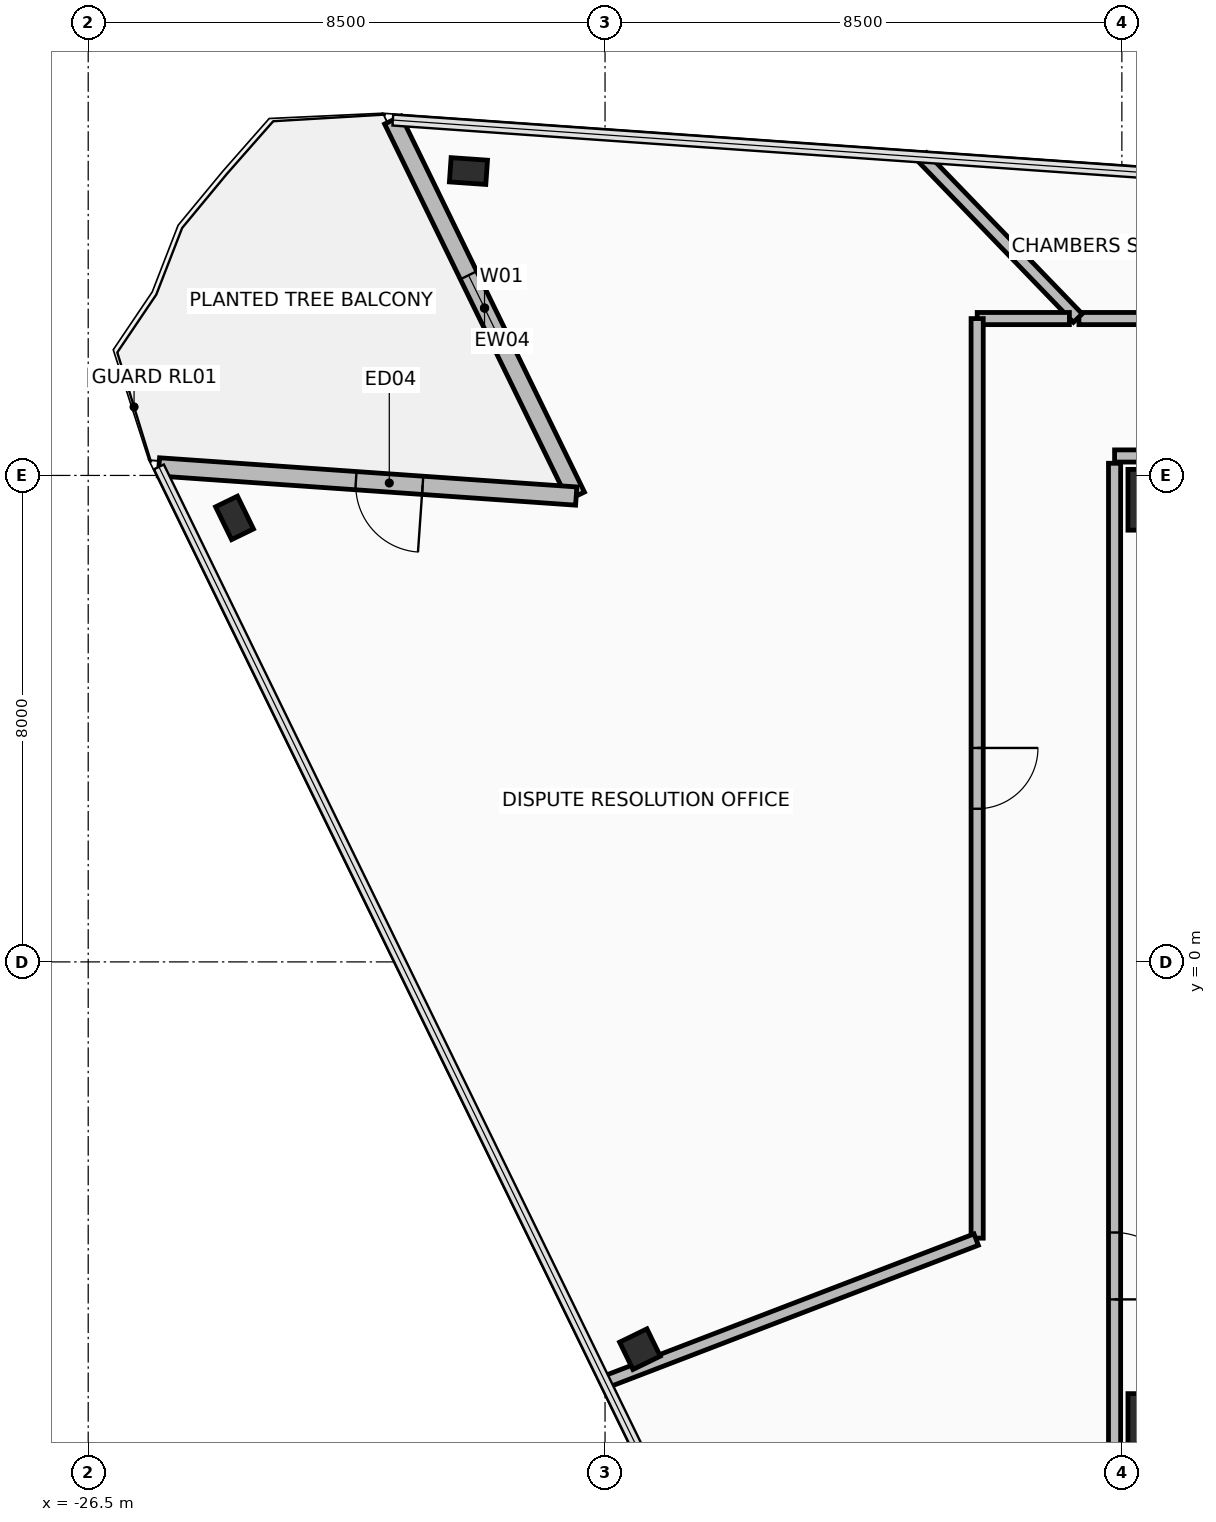
"""IFC4 building model, lengths in metres.
Left out: names, types, materials, properties, quantities, classifications, styles, units other than length and angle.
Written with IfcOpenShell. Run it as: python <this file> out.ifc"""

import sys

from ifc_helpers import new_model, si_unit, direction, frame, frame_2d, origin, origin_2d, place, context, subcontext, project, spatial, rectangle, hollow_rectangle, extrude, element, fill, save


model = new_model("IFC4")
c1 = context("Model", 3, precision=1e-05, world=origin(), true_north=direction((0.0, 1.0)))
c2 = subcontext(c1, "Body", "Model", "MODEL_VIEW")
j1 = project(units=[si_unit("LENGTHUNIT", "METRE"), si_unit("PLANEANGLEUNIT", "RADIAN")], contexts=[c1])
p1 = place(None, origin())
s1 = spatial("IfcSite", under=j1, at=p1, CompositionType="ELEMENT")
p2 = place(p1, origin())
s2 = spatial("IfcBuilding", under=s1, at=p2, CompositionType="ELEMENT")
p3 = place(p2, frame((0.0, 0.0, 241.45)))
s3 = spatial("IfcBuildingStorey", under=s2, at=p3, CompositionType="ELEMENT", Elevation=241.45)
for number, where, z_axis, x_axis in (
    (1, (-8.9, -7.6, 0.0), (0.0, 0.0, 1.0), (1.0, 0.0, 0.0)),
    (2, (-8.9, 7.6, 0.0), (0.0, 0.0, 1.0), (1.0, 0.0, 0.0)),
):
    element("IfcColumn", number, at=place(p3, frame(where, z_axis=z_axis, x_axis=x_axis)), inside=s3, PredefinedType="COLUMN", context=c2, shape_type="SweptSolid", body=[
        extrude(rectangle(XDim=1.0, YDim=1.0, at=origin_2d()), origin(), (0.0, 0.0, 1.0), 3.6),
    ])
p4 = place(p3, frame((-24.094, 7.302, 0.0), z_axis=(0.0, 0.0, 1.0), x_axis=(-0.438371146789, 0.898794046299, 0.0)))
e3 = element("IfcColumn", 3, at=p4, inside=s3, PredefinedType="COLUMN", context=c2, shape_type="SweptSolid", body=[
    extrude(hollow_rectangle(XDim=0.4, YDim=0.6, WallThickness=0.03, at=origin_2d()), origin(), (0.0, 0.0, 1.0), 3.6),
])
p5 = place(p3, frame((-17.426, -6.369, 0.0), z_axis=(0.0, 0.0, 1.0), x_axis=(-0.438371146789, 0.898794046299, 0.0)))
e4 = element("IfcColumn", 4, at=p5, inside=s3, PredefinedType="COLUMN", context=c2, shape_type="SweptSolid", body=[
    extrude(hollow_rectangle(XDim=0.5, YDim=0.5, WallThickness=0.032, at=origin_2d()), origin(), (0.0, 0.0, 1.0), 3.6),
])
p6 = place(p3, frame((-20.246, 13.006, 0.0), z_axis=(0.0, 0.0, 1.0), x_axis=(-0.99756405026, 0.069756473744, 0.0)))
e5 = element("IfcColumn", 5, at=p6, inside=s3, PredefinedType="COLUMN", context=c2, shape_type="SweptSolid", body=[
    extrude(hollow_rectangle(XDim=0.4, YDim=0.6, WallThickness=0.03, at=origin_2d()), origin(), (0.0, 0.0, 1.0), 3.6),
])
p7 = place(p3, frame((-21.49, 13.844, 0.0), z_axis=(0.0, 0.0, 1.0), x_axis=(0.438391471143, -0.898784133165, 0.0)))
e6 = element("IfcWall", 6, at=p7, inside=s3, PredefinedType="STANDARD", context=c2, shape_type="SweptSolid", body=[
    extrude(rectangle(XDim=6.88, YDim=0.3, at=frame_2d((3.44, 0.0))), origin(), (0.0, 0.0, 1.0), 2.765),
])
p8 = place(p7, frame((2.84, 0.0, 0.485)))
e7 = element("IfcOpeningElement", 7, at=p8, cuts=e6, PredefinedType="OPENING", context=c2, shape_type="SweptSolid", body=[
    extrude(rectangle(XDim=1.2, YDim=2.1, at=frame_2d((0.6, 1.05))), frame((0.0, 0.16, 0.0), z_axis=(0.0, -1.0, 0.0), x_axis=(1.0, 0.0, 0.0)), (0.0, 0.0, 1.0), 0.32),
])
p9 = place(p3, frame((-18.474, 7.661, 0.0), z_axis=(0.0, 0.0, 1.0), x_axis=(-0.997565982203, 0.069728840176, 0.0)))
e8 = element("IfcWall", 8, at=p9, inside=s3, PredefinedType="STANDARD", context=c2, shape_type="SweptSolid", body=[
    extrude(rectangle(XDim=6.88, YDim=0.3, at=frame_2d((3.44, 0.0))), origin(), (0.0, 0.0, 1.0), 2.765),
])
p10 = place(p9, frame((2.532, 0.0, 0.0)))
e9 = element("IfcOpeningElement", 9, at=p10, cuts=e8, PredefinedType="OPENING", context=c2, shape_type="SweptSolid", body=[
    extrude(rectangle(XDim=1.1, YDim=2.2, at=frame_2d((0.55, 1.1))), frame((0.0, 0.16, 0.0), z_axis=(0.0, -1.0, 0.0), x_axis=(1.0, 0.0, 0.0)), (0.0, 0.0, 1.0), 0.32),
])
p11 = place(p3, frame((9.62, 8.32, 0.0), z_axis=(0.0, 0.0, 1.0), x_axis=(-1.0, 0.0, 0.0)))
e10 = element("IfcWall", 10, at=p11, inside=s3, PredefinedType="PARTITIONING", context=c2, shape_type="SweptSolid", body=[
    extrude(rectangle(XDim=19.24, YDim=0.2, at=frame_2d((9.62, 0.0))), origin(), (0.0, 0.0, 1.0), 2.915),
])
p12 = place(p11, frame((10.97, 0.0, 0.0)))
e11 = element("IfcOpeningElement", 11, at=p12, cuts=e10, PredefinedType="OPENING", context=c2, shape_type="SweptSolid", body=[
    extrude(rectangle(XDim=0.9, YDim=2.1, at=frame_2d((0.45, 1.05))), frame((0.0, 0.11, 0.0), z_axis=(0.0, -1.0, 0.0), x_axis=(1.0, 0.0, 0.0)), (0.0, 0.0, 1.0), 0.22),
])
p13 = place(p11, frame((7.57, 0.0, 0.0)))
e12 = element("IfcOpeningElement", 12, at=p13, cuts=e10, PredefinedType="OPENING", context=c2, shape_type="SweptSolid", body=[
    extrude(rectangle(XDim=0.9, YDim=2.1, at=frame_2d((0.45, 1.05))), frame((0.0, 0.11, 0.0), z_axis=(0.0, -1.0, 0.0), x_axis=(1.0, 0.0, 0.0)), (0.0, 0.0, 1.0), 0.22),
])
p14 = place(p11, frame((15.02, 0.0, 0.0)))
e13 = element("IfcOpeningElement", 13, at=p14, cuts=e10, PredefinedType="OPENING", context=c2, shape_type="SweptSolid", body=[
    extrude(rectangle(XDim=0.9, YDim=2.1, at=frame_2d((0.45, 1.05))), frame((0.0, 0.11, 0.0), z_axis=(0.0, -1.0, 0.0), x_axis=(1.0, 0.0, 0.0)), (0.0, 0.0, 1.0), 0.22),
])
p15 = place(p3, frame((-9.62, 8.2, 0.0), z_axis=(0.0, 0.0, 1.0), x_axis=(0.0, -1.0, 0.0)))
e14 = element("IfcWall", 14, at=p15, inside=s3, PredefinedType="PARTITIONING", context=c2, shape_type="SweptSolid", body=[
    extrude(rectangle(XDim=16.4, YDim=0.2, at=frame_2d((8.2, 0.0))), origin(), (0.0, 0.0, 1.0), 2.765),
])
p16 = place(p15, frame((12.65, 0.0, 0.0)))
e15 = element("IfcOpeningElement", 15, at=p16, cuts=e14, PredefinedType="OPENING", context=c2, shape_type="SweptSolid", body=[
    extrude(rectangle(XDim=1.1, YDim=2.15, at=frame_2d((0.55, 1.075))), frame((0.0, 0.11, 0.0), z_axis=(0.0, -1.0, 0.0), x_axis=(1.0, 0.0, 0.0)), (0.0, 0.0, 1.0), 0.22),
])
p17 = place(p3, frame((3.625, 10.58, 0.0), z_axis=(0.0, 0.0, 1.0), x_axis=(-1.0, 0.0, 0.0)))
e16 = element("IfcWall", 16, at=p17, inside=s3, PredefinedType="PARTITIONING", context=c2, shape_type="SweptSolid", body=[
    extrude(rectangle(XDim=13.832, YDim=0.2, at=frame_2d((6.916, 0.0))), origin(), (0.0, 0.0, 1.0), 2.915),
])
p18 = place(p17, frame((6.416, 0.0, 0.0)))
e17 = element("IfcOpeningElement", 17, at=p18, cuts=e16, PredefinedType="OPENING", context=c2, shape_type="SweptSolid", body=[
    extrude(rectangle(XDim=1.0, YDim=2.15, at=frame_2d((0.5, 1.075))), frame((0.0, 0.11, 0.0), z_axis=(0.0, -1.0, 0.0), x_axis=(1.0, 0.0, 0.0)), (0.0, 0.0, 1.0), 0.22),
])
p19 = place(p3, frame((-10.224, 10.588, 0.0), z_axis=(0.0, 0.0, 1.0), x_axis=(-0.694663159554, 0.719335175532, 0.0)))
e18 = element("IfcWall", 18, at=p19, inside=s3, PredefinedType="PARTITIONING", context=c2, shape_type="SweptSolid", body=[
    extrude(rectangle(XDim=3.681, YDim=0.2, at=frame_2d((1.841, 0.0))), origin(), (0.0, 0.0, 1.0), 2.765),
])
p20 = place(p3, frame((-10.363, 10.58, 0.0), z_axis=(0.0, 0.0, 1.0), x_axis=(-1.0, 0.0, 0.0)))
e19 = element("IfcWall", 19, at=p20, inside=s3, PredefinedType="PARTITIONING", context=c2, shape_type="SweptSolid", body=[
    extrude(rectangle(XDim=1.516, YDim=0.2, at=frame_2d((0.758, 0.0))), origin(), (0.0, 0.0, 1.0), 3.42),
])
p21 = place(p3, frame((-11.88, 10.579, 0.0), z_axis=(0.0, 0.0, 1.0), x_axis=(0.0, -1.0, 0.0)))
e20 = element("IfcWall", 20, at=p21, inside=s3, PredefinedType="PARTITIONING", context=c2, shape_type="SweptSolid", body=[
    extrude(rectangle(XDim=15.123, YDim=0.2, at=frame_2d((7.561, 0.0))), origin(), (0.0, 0.0, 1.0), 2.765),
])
p22 = place(p21, frame((7.061, 0.0, 0.0)))
e21 = element("IfcOpeningElement", 21, at=p22, cuts=e20, PredefinedType="OPENING", context=c2, shape_type="SweptSolid", body=[
    extrude(rectangle(XDim=1.0, YDim=2.15, at=frame_2d((0.5, 1.075))), frame((0.0, 0.11, 0.0), z_axis=(0.0, -1.0, 0.0), x_axis=(1.0, 0.0, 0.0)), (0.0, 0.0, 1.0), 0.22),
])
p23 = place(p3, frame((-11.896, -4.566, 0.0), z_axis=(0.0, 0.0, 1.0), x_axis=(-0.933585017774, -0.358355988632, 0.0)))
e22 = element("IfcWall", 22, at=p23, inside=s3, PredefinedType="PARTITIONING", context=c2, shape_type="SweptSolid", body=[
    extrude(rectangle(XDim=6.512, YDim=0.2, at=frame_2d((3.256, 0.0))), origin(), (0.0, 0.0, 1.0), 2.765),
])
p24 = place(p10, origin())
e23 = element("IfcDoor", 23, at=p24, inside=s3, OperationType="SINGLE_SWING_LEFT", PredefinedType="DOOR", context=c2, shape_type="SweptSolid", body=[
    extrude(rectangle(XDim=1.1, YDim=2.2, at=frame_2d((0.55, 1.1))), frame((0.0, 0.025, 0.0), z_axis=(0.0, -1.0, 0.0), x_axis=(1.0, 0.0, 0.0)), (0.0, 0.0, 1.0), 0.05),
])
fill(e9, e23)
p25 = place(p8, origin())
e24 = element("IfcWindow", 24, at=p25, inside=s3, PartitioningType="SINGLE_PANEL", PredefinedType="WINDOW", context=c2, shape_type="SweptSolid", body=[
    extrude(rectangle(XDim=1.2, YDim=2.1, at=frame_2d((0.6, 1.05))), frame((0.0, 0.03, 0.0), z_axis=(0.0, -1.0, 0.0), x_axis=(1.0, 0.0, 0.0)), (0.0, 0.0, 1.0), 0.06),
])
fill(e7, e24)
p26 = place(p16, frame((1.1, 0.0, 0.0), z_axis=(0.0, 0.0, 1.0), x_axis=(-1.0, 0.0, 0.0)))
e25 = element("IfcDoor", 25, at=p26, inside=s3, OperationType="SINGLE_SWING_LEFT", PredefinedType="DOOR", context=c2, shape_type="SweptSolid", body=[
    extrude(rectangle(XDim=1.1, YDim=2.15, at=frame_2d((0.55, 1.075))), frame((0.0, 0.025, 0.0), z_axis=(0.0, -1.0, 0.0), x_axis=(1.0, 0.0, 0.0)), (0.0, 0.0, 1.0), 0.05),
])
fill(e15, e25)
p27 = place(p22, origin())
e26 = element("IfcDoor", 26, at=p27, inside=s3, OperationType="SINGLE_SWING_RIGHT", PredefinedType="DOOR", context=c2, shape_type="SweptSolid", body=[
    extrude(rectangle(XDim=1.0, YDim=2.15, at=frame_2d((0.5, 1.075))), frame((0.0, 0.025, 0.0), z_axis=(0.0, -1.0, 0.0), x_axis=(1.0, 0.0, 0.0)), (0.0, 0.0, 1.0), 0.05),
])
fill(e21, e26)
save(model, sys.argv[1])
